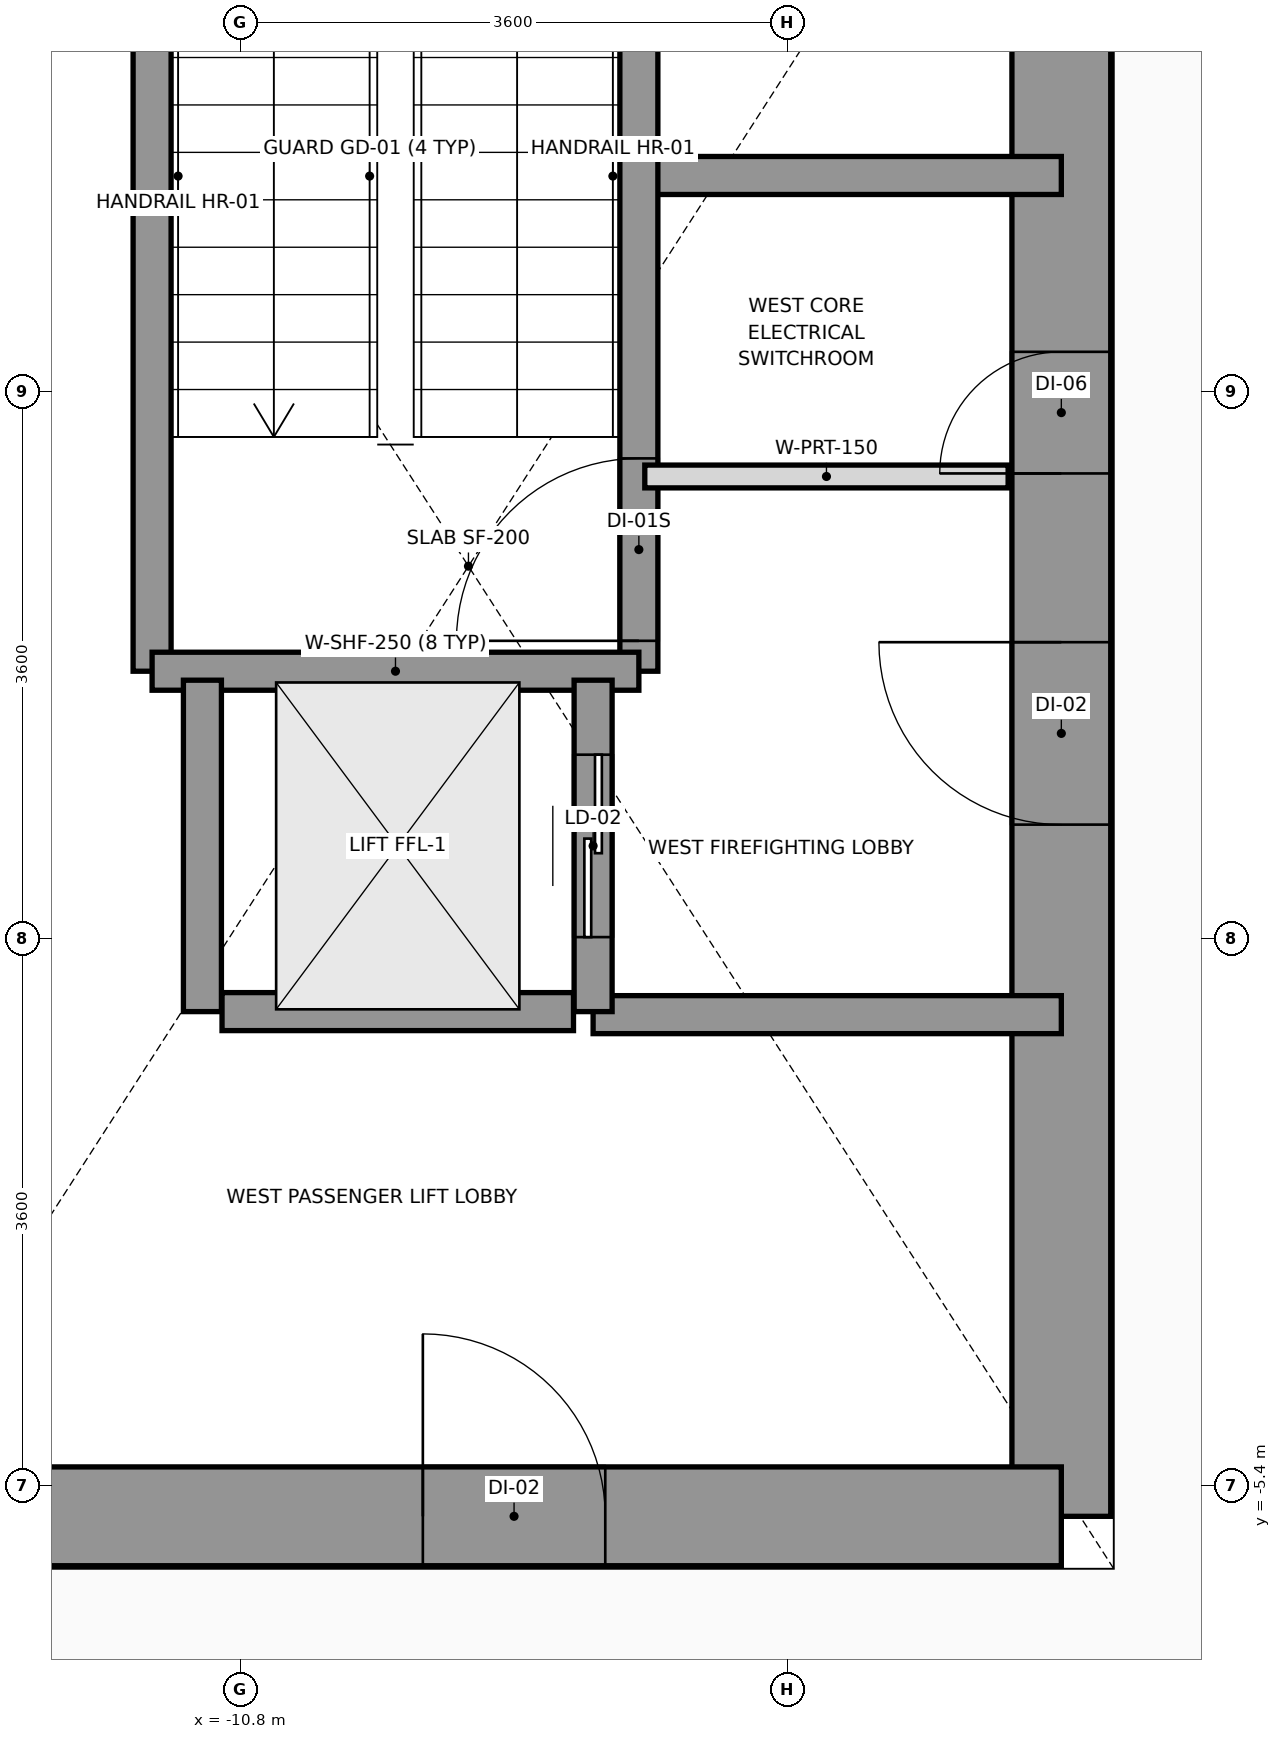
"""IFC4 building model, lengths in metres.
Left out: names, types, materials, properties, quantities, classifications, styles, units other than length and angle.
Written with IfcOpenShell. Run it as: python <this file> out.ifc"""

import sys

from ifc_helpers import new_model, si_unit, direction, frame, frame_2d, origin, place, context, subcontext, project, spatial, rectangle, extrude, source, transform, mapped, element, fill, save


model = new_model("IFC4")
c1 = context("Model", 3, precision=1e-05, world=origin(), true_north=direction((0.0, 1.0)))
c2 = subcontext(c1, "Body", "Model", "MODEL_VIEW")
j1 = project(units=[si_unit("LENGTHUNIT", "METRE"), si_unit("PLANEANGLEUNIT", "RADIAN")], contexts=[c1])
p1 = place(None, origin())
s1 = spatial("IfcSite", under=j1, at=p1, CompositionType="ELEMENT")
p2 = place(p1, origin())
s2 = spatial("IfcBuilding", under=s1, at=p2, CompositionType="ELEMENT")
p3 = place(p2, frame((0.0, 0.0, -8.4)))
s3 = spatial("IfcBuildingStorey", under=s2, at=p3, CompositionType="ELEMENT", Elevation=-8.4)
p4 = place(p3, frame((-5.4, -5.6, -0.2), z_axis=(0.0, 0.0, 1.0), x_axis=(0.0, 1.0, 0.0)))
e1 = element("IfcWall", 1, at=p4, inside=s3, PredefinedType="SHEAR", context=c2, shape_type="SweptSolid", body=[
    extrude(rectangle(XDim=12.5, YDim=0.65, at=frame_2d((6.25, 0.0))), origin(), (0.0, 0.0, 1.0), 4.12),
])
p5 = place(p4, frame((4.55, 0.0, 0.2)))
e2 = element("IfcOpeningElement", 2, at=p5, cuts=e1, PredefinedType="OPENING", context=c2, shape_type="SweptSolid", body=[
    extrude(rectangle(XDim=1.2, YDim=2.2, at=frame_2d((0.6, 1.1))), frame((0.0, 0.335, 0.0), z_axis=(0.0, -1.0, 0.0), x_axis=(1.0, 0.0, 0.0)), (0.0, 0.0, 1.0), 0.67),
])
p6 = place(p4, frame((6.86, 0.0, 0.2)))
e3 = element("IfcOpeningElement", 3, at=p6, cuts=e1, PredefinedType="OPENING", context=c2, shape_type="SweptSolid", body=[
    extrude(rectangle(XDim=0.8, YDim=2.1, at=frame_2d((0.4, 1.05))), frame((0.0, 0.335, 0.0), z_axis=(0.0, -1.0, 0.0), x_axis=(1.0, 0.0, 0.0)), (0.0, 0.0, 1.0), 0.67),
])
p7 = place(p3, frame((-13.2, -5.6, -0.2), z_axis=(0.0, 0.0, 1.0), x_axis=(1.0, 0.0, 0.0)))
e4 = element("IfcWall", 4, at=p7, inside=s3, PredefinedType="SHEAR", context=c2, shape_type="SweptSolid", body=[
    extrude(rectangle(XDim=7.8, YDim=0.65, at=frame_2d((3.9, 0.0))), origin(), (0.0, 0.0, 1.0), 4.12),
])
p8 = place(p7, frame((3.6, 0.0, 0.2)))
e5 = element("IfcOpeningElement", 5, at=p8, cuts=e4, PredefinedType="OPENING", context=c2, shape_type="SweptSolid", body=[
    extrude(rectangle(XDim=1.2, YDim=2.2, at=frame_2d((0.6, 1.1))), frame((0.0, 0.335, 0.0), z_axis=(0.0, -1.0, 0.0), x_axis=(1.0, 0.0, 0.0)), (0.0, 0.0, 1.0), 0.67),
])
p9 = place(p3, frame((-8.18, 3.22, -0.2), z_axis=(0.0, 0.0, 1.0), x_axis=(1.0, 0.0, 0.0)))
e6 = element("IfcWall", 6, at=p9, inside=s3, PredefinedType="SOLIDWALL", context=c2, shape_type="SweptSolid", body=[
    extrude(rectangle(XDim=2.78, YDim=0.25, at=frame_2d((1.39, 0.0))), origin(), (0.0, 0.0, 1.0), 4.12),
])
p10 = place(p3, frame((-8.48, -2.3, -0.2), z_axis=(0.0, 0.0, 1.0), x_axis=(1.0, 0.0, 0.0)))
e7 = element("IfcWall", 7, at=p10, inside=s3, PredefinedType="SOLIDWALL", context=c2, shape_type="SweptSolid", body=[
    extrude(rectangle(XDim=3.08, YDim=0.25, at=frame_2d((1.54, 0.0))), origin(), (0.0, 0.0, 1.0), 4.12),
])
p11 = place(p3, frame((-8.179, -0.041, -0.2), z_axis=(0.0, 0.0, 1.0), x_axis=(0.0, 1.0, 0.0)))
e8 = element("IfcWall", 8, at=p11, inside=s3, PredefinedType="SOLIDWALL", context=c2, shape_type="SweptSolid", body=[
    extrude(rectangle(XDim=6.941, YDim=0.25, at=frame_2d((3.47, 0.0))), origin(), (0.0, 0.0, 1.0), 4.12),
])
p12 = place(p11, frame((0.2, 0.0, 0.2)))
e9 = element("IfcOpeningElement", 9, at=p12, cuts=e8, PredefinedType="OPENING", context=c2, shape_type="SweptSolid", body=[
    extrude(rectangle(XDim=1.2, YDim=2.2, at=frame_2d((0.6, 1.1))), frame((0.0, 0.135, 0.0), z_axis=(0.0, -1.0, 0.0), x_axis=(1.0, 0.0, 0.0)), (0.0, 0.0, 1.0), 0.27),
])
p13 = place(p3, frame((-11.381, -0.041, -0.2), z_axis=(0.0, 0.0, 1.0), x_axis=(0.0, 1.0, 0.0)))
e10 = element("IfcWall", 10, at=p13, inside=s3, PredefinedType="SOLIDWALL", context=c2, shape_type="SweptSolid", body=[
    extrude(rectangle(XDim=6.941, YDim=0.25, at=frame_2d((3.47, 0.0))), origin(), (0.0, 0.0, 1.0), 4.12),
])
p14 = place(p3, frame((-11.381, -0.041, -0.2), z_axis=(0.0, 0.0, 1.0), x_axis=(1.0, 0.0, 0.0)))
e11 = element("IfcWall", 11, at=p14, inside=s3, PredefinedType="SOLIDWALL", context=c2, shape_type="SweptSolid", body=[
    extrude(rectangle(XDim=3.202, YDim=0.25, at=frame_2d((1.601, 0.0))), origin(), (0.0, 0.0, 1.0), 4.12),
])
p15 = place(p3, frame((-11.05, -2.28, -0.2), z_axis=(0.0, 0.0, 1.0), x_axis=(0.0, 1.0, 0.0)))
e12 = element("IfcWall", 12, at=p15, inside=s3, PredefinedType="SOLIDWALL", context=c2, shape_type="SweptSolid", body=[
    extrude(rectangle(XDim=2.18, YDim=0.25, at=frame_2d((1.09, 0.0))), origin(), (0.0, 0.0, 1.0), 4.12),
])
p16 = place(p3, frame((-8.48, -2.28, -0.2), z_axis=(0.0, 0.0, 1.0), x_axis=(0.0, 1.0, 0.0)))
e13 = element("IfcWall", 13, at=p16, inside=s3, PredefinedType="SOLIDWALL", context=c2, shape_type="SweptSolid", body=[
    extrude(rectangle(XDim=2.18, YDim=0.25, at=frame_2d((1.09, 0.0))), origin(), (0.0, 0.0, 1.0), 4.12),
])
p17 = place(p16, frame((0.49, 0.0, 0.2)))
e14 = element("IfcOpeningElement", 14, at=p17, cuts=e13, PredefinedType="OPENING", context=c2, shape_type="SweptSolid", body=[
    extrude(rectangle(XDim=1.2, YDim=2.2, at=frame_2d((0.6, 1.1))), frame((0.0, 0.135, 0.0), z_axis=(0.0, -1.0, 0.0), x_axis=(1.0, 0.0, 0.0)), (0.0, 0.0, 1.0), 0.27),
])
p18 = place(p3, frame((-10.921, -2.28, -0.2), z_axis=(0.0, 0.0, 1.0), x_axis=(1.0, 0.0, 0.0)))
e15 = element("IfcWall", 15, at=p18, inside=s3, PredefinedType="SOLIDWALL", context=c2, shape_type="SweptSolid", body=[
    extrude(rectangle(XDim=2.312, YDim=0.25, at=frame_2d((1.156, 0.0))), origin(), (0.0, 0.0, 1.0), 4.12),
])
p19 = place(p3, frame((-8.14, 1.24, 0.0), z_axis=(0.0, 0.0, 1.0), x_axis=(1.0, 0.0, 0.0)))
e16 = element("IfcWall", 16, at=p19, inside=s3, PredefinedType="PARTITIONING", context=c2, shape_type="SweptSolid", body=[
    extrude(rectangle(XDim=2.39, YDim=0.15, at=frame_2d((1.195, 0.0))), origin(), (0.0, 0.0, 1.0), 3.02),
])
m1 = source(origin(), c2, "Body", "SweptSolid", [
    extrude(rectangle(XDim=1.2, YDim=2.2, at=frame_2d((0.6, 1.1))), frame((0.0, 0.025, 0.0), z_axis=(0.0, -1.0, 0.0), x_axis=(1.0, 0.0, 0.0)), (0.0, 0.0, 1.0), 0.05),
])
p20 = place(p12, origin())
e17 = element("IfcDoor", 17, at=p20, inside=s3, OperationType="SINGLE_SWING_LEFT", PredefinedType="DOOR", context=c2, shape_type="MappedRepresentation", body=[
    mapped(m1, transform((0.0, 0.0, 0.0), x_axis=(1.0, 0.0, 0.0), y_axis=(0.0, 1.0, 0.0), z_axis=(0.0, 0.0, 1.0), scale=1.0)),
])
fill(e9, e17)
p21 = place(p5, origin())
e18 = element("IfcDoor", 18, at=p21, inside=s3, OperationType="SINGLE_SWING_RIGHT", PredefinedType="DOOR", context=c2, shape_type="MappedRepresentation", body=[
    mapped(m1, transform((0.0, 0.0, 0.0), x_axis=(1.0, 0.0, 0.0), y_axis=(0.0, 1.0, 0.0), z_axis=(0.0, 0.0, 1.0), scale=1.0)),
])
fill(e2, e18)
p22 = place(p8, origin())
e19 = element("IfcDoor", 19, at=p22, inside=s3, OperationType="SINGLE_SWING_LEFT", PredefinedType="DOOR", context=c2, shape_type="MappedRepresentation", body=[
    mapped(m1, transform((0.0, 0.0, 0.0), x_axis=(1.0, 0.0, 0.0), y_axis=(0.0, 1.0, 0.0), z_axis=(0.0, 0.0, 1.0), scale=1.0)),
])
fill(e5, e19)
m2 = source(origin(), c2, "Body", "SweptSolid", [
    extrude(rectangle(XDim=0.8, YDim=2.1, at=frame_2d((0.4, 1.05))), frame((0.0, 0.025, 0.0), z_axis=(0.0, -1.0, 0.0), x_axis=(1.0, 0.0, 0.0)), (0.0, 0.0, 1.0), 0.05),
])
p23 = place(p6, origin())
e20 = element("IfcDoor", 20, at=p23, inside=s3, OperationType="SINGLE_SWING_LEFT", PredefinedType="DOOR", context=c2, shape_type="MappedRepresentation", body=[
    mapped(m2, transform((0.0, 0.0, 0.0), x_axis=(1.0, 0.0, 0.0), y_axis=(0.0, 1.0, 0.0), z_axis=(0.0, 0.0, 1.0), scale=1.0)),
])
fill(e3, e20)
p24 = place(p17, origin())
e21 = element("IfcDoor", 21, at=p24, inside=s3, OperationType="SLIDING_TO_RIGHT", PredefinedType="DOOR", context=c2, shape_type="MappedRepresentation", body=[
    mapped(m1, transform((0.0, 0.0, 0.0), x_axis=(1.0, 0.0, 0.0), y_axis=(0.0, 1.0, 0.0), z_axis=(0.0, 0.0, 1.0), scale=1.0)),
])
fill(e14, e21)
save(model, sys.argv[1])
